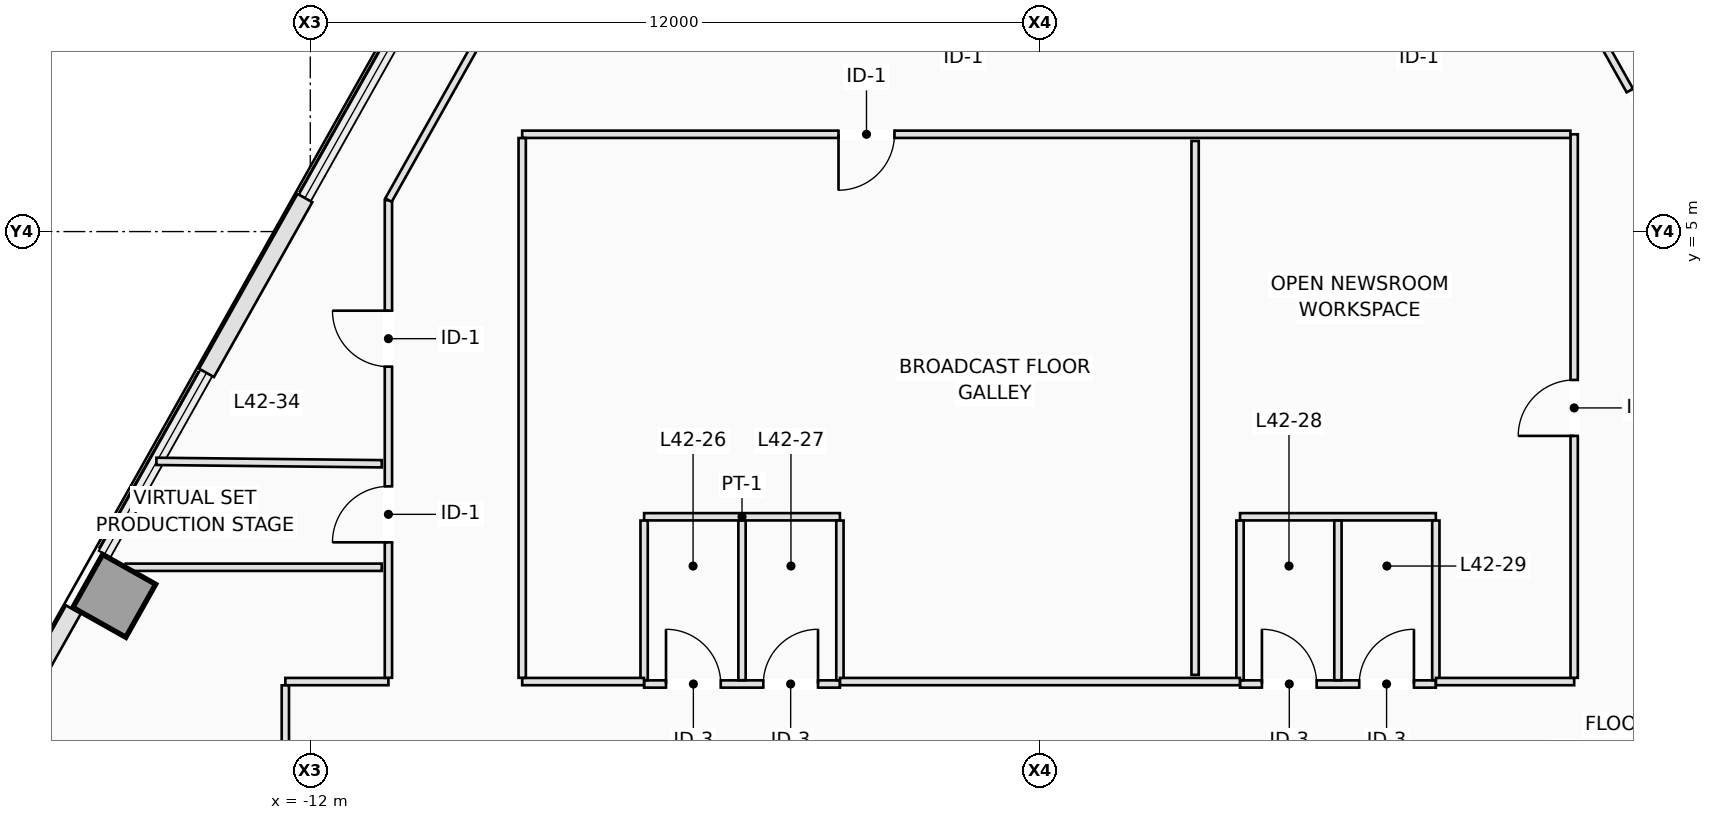
"""IFC4 building model, lengths in metres.
Left out: names, types, materials, properties, quantities, classifications, styles, units other than length and angle.
Written with IfcOpenShell. Run it as: python <this file> out.ifc"""

import sys

from ifc_helpers import new_model, si_unit, direction, frame, frame_2d, origin, origin_2d, place, context, subcontext, project, spatial, rectangle, extrude, element, fill, save


model = new_model("IFC4")
c1 = context("Model", 3, precision=1e-05, world=origin(), true_north=direction((0.0, 1.0)))
c2 = subcontext(c1, "Body", "Model", "MODEL_VIEW")
j1 = project(units=[si_unit("LENGTHUNIT", "METRE"), si_unit("PLANEANGLEUNIT", "RADIAN")], contexts=[c1])
p1 = place(None, origin())
s1 = spatial("IfcSite", under=j1, at=p1, CompositionType="ELEMENT")
p2 = place(p1, origin())
s2 = spatial("IfcBuilding", under=s1, at=p2, CompositionType="ELEMENT")
p3 = place(p2, frame((0.0, 0.0, 154.5)))
s3 = spatial("IfcBuildingStorey", under=s2, at=p3, CompositionType="ELEMENT", Elevation=154.5)
p4 = place(p3, frame((-15.224, -0.991, 0.0), z_axis=(0.0, 0.0, 1.0), x_axis=(-0.871575139605, 0.490261946333, 0.0)))
e1 = element("IfcColumn", 1, at=p4, inside=s3, PredefinedType="COLUMN", context=c2, shape_type="SweptSolid", body=[
    extrude(rectangle(XDim=1.0, YDim=1.0, at=origin_2d()), origin(), (0.0, 0.0, 1.0), 3.5),
])
p5 = place(p3, frame((-17.154, -3.453, 0.0), z_axis=(0.0, 0.0, 1.0), x_axis=(0.490229640206, 0.871593311048, 0.0)))
e2 = element("IfcWall", 2, at=p5, inside=s3, PredefinedType="STANDARD", context=c2, shape_type="SweptSolid", body=[
    extrude(rectangle(XDim=2.568, YDim=0.28, at=frame_2d((1.284, 0.0))), origin(), (0.0, 0.0, 1.0), 3.25),
])
p6 = place(p3, frame((-13.706, 2.677, 0.0), z_axis=(0.0, 0.0, 1.0), x_axis=(0.490285834707, 0.871561701938, 0.0)))
e3 = element("IfcWall", 3, at=p6, inside=s3, PredefinedType="STANDARD", context=c2, shape_type="SweptSolid", body=[
    extrude(rectangle(XDim=3.299, YDim=0.28, at=frame_2d((1.649, 0.0))), origin(), (0.0, 0.0, 1.0), 3.25),
])
p7 = place(p3, frame((-6.51, -2.44, 0.0), z_axis=(0.0, 0.0, 1.0), x_axis=(1.0, 0.0, 0.0)))
e4 = element("IfcWall", 4, at=p7, inside=s3, PredefinedType="PARTITIONING", context=c2, shape_type="SweptSolid", body=[
    extrude(rectangle(XDim=3.22, YDim=0.12, at=frame_2d((1.61, 0.0))), origin(), (0.0, 0.0, 1.0), 2.891),
])
p8 = place(p7, frame((0.36, 0.0, 0.0)))
e5 = element("IfcOpeningElement", 5, at=p8, cuts=e4, PredefinedType="OPENING", context=c2, shape_type="SweptSolid", body=[
    extrude(rectangle(XDim=0.9, YDim=2.12, at=frame_2d((0.45, 1.06))), frame((0.0, 0.07, 0.0), z_axis=(0.0, -1.0, 0.0), x_axis=(1.0, 0.0, 0.0)), (0.0, 0.0, 1.0), 0.14),
])
p9 = place(p7, frame((1.96, 0.0, 0.0)))
e6 = element("IfcOpeningElement", 6, at=p9, cuts=e4, PredefinedType="OPENING", context=c2, shape_type="SweptSolid", body=[
    extrude(rectangle(XDim=0.9, YDim=2.12, at=frame_2d((0.45, 1.06))), frame((0.0, 0.07, 0.0), z_axis=(0.0, -1.0, 0.0), x_axis=(1.0, 0.0, 0.0)), (0.0, 0.0, 1.0), 0.14),
])
p10 = place(p3, frame((-6.51, 0.31, 0.0), z_axis=(0.0, 0.0, 1.0), x_axis=(1.0, 0.0, 0.0)))
e7 = element("IfcWall", 7, at=p10, inside=s3, PredefinedType="PARTITIONING", context=c2, shape_type="SweptSolid", body=[
    extrude(rectangle(XDim=3.22, YDim=0.12, at=frame_2d((1.61, 0.0))), origin(), (0.0, 0.0, 1.0), 3.25),
])
for number, where, z_axis, x_axis in (
    (8, (-6.51, -2.378, 0.0), (0.0, 0.0, 1.0), (0.0, 1.0, 0.0)),
    (9, (-4.9, -2.378, 0.0), (0.0, 0.0, 1.0), (0.0, 1.0, 0.0)),
    (10, (-3.29, -2.378, 0.0), (0.0, 0.0, 1.0), (0.0, 1.0, 0.0)),
):
    element("IfcWall", number, at=place(p3, frame(where, z_axis=z_axis, x_axis=x_axis)), inside=s3, PredefinedType="PARTITIONING", context=c2, shape_type="SweptSolid", body=[
        extrude(rectangle(XDim=2.626, YDim=0.12, at=frame_2d((1.313, 0.0))), origin(), (0.0, 0.0, 1.0), 3.25),
    ])
p11 = place(p3, frame((3.29, -2.44, 0.0), z_axis=(0.0, 0.0, 1.0), x_axis=(1.0, 0.0, 0.0)))
e11 = element("IfcWall", 11, at=p11, inside=s3, PredefinedType="PARTITIONING", context=c2, shape_type="SweptSolid", body=[
    extrude(rectangle(XDim=3.22, YDim=0.12, at=frame_2d((1.61, 0.0))), origin(), (0.0, 0.0, 1.0), 2.891),
])
p12 = place(p11, frame((0.36, 0.0, 0.0)))
e12 = element("IfcOpeningElement", 12, at=p12, cuts=e11, PredefinedType="OPENING", context=c2, shape_type="SweptSolid", body=[
    extrude(rectangle(XDim=0.9, YDim=2.12, at=frame_2d((0.45, 1.06))), frame((0.0, 0.07, 0.0), z_axis=(0.0, -1.0, 0.0), x_axis=(1.0, 0.0, 0.0)), (0.0, 0.0, 1.0), 0.14),
])
p13 = place(p11, frame((1.96, 0.0, 0.0)))
e13 = element("IfcOpeningElement", 13, at=p13, cuts=e11, PredefinedType="OPENING", context=c2, shape_type="SweptSolid", body=[
    extrude(rectangle(XDim=0.9, YDim=2.12, at=frame_2d((0.45, 1.06))), frame((0.0, 0.07, 0.0), z_axis=(0.0, -1.0, 0.0), x_axis=(1.0, 0.0, 0.0)), (0.0, 0.0, 1.0), 0.14),
])
p14 = place(p3, frame((3.29, 0.31, 0.0), z_axis=(0.0, 0.0, 1.0), x_axis=(1.0, 0.0, 0.0)))
e14 = element("IfcWall", 14, at=p14, inside=s3, PredefinedType="PARTITIONING", context=c2, shape_type="SweptSolid", body=[
    extrude(rectangle(XDim=3.22, YDim=0.12, at=frame_2d((1.61, 0.0))), origin(), (0.0, 0.0, 1.0), 3.25),
])
for number, where, z_axis, x_axis in (
    (15, (3.29, -2.378, 0.0), (0.0, 0.0, 1.0), (0.0, 1.0, 0.0)),
    (16, (4.9, -2.378, 0.0), (0.0, 0.0, 1.0), (0.0, 1.0, 0.0)),
    (17, (6.51, -2.378, 0.0), (0.0, 0.0, 1.0), (0.0, 1.0, 0.0)),
):
    element("IfcWall", number, at=place(p3, frame(where, z_axis=z_axis, x_axis=x_axis)), inside=s3, PredefinedType="PARTITIONING", context=c2, shape_type="SweptSolid", body=[
        extrude(rectangle(XDim=2.626, YDim=0.12, at=frame_2d((1.313, 0.0))), origin(), (0.0, 0.0, 1.0), 3.25),
    ])
p15 = place(p3, frame((-12.41, -2.4, 0.0), z_axis=(0.0, 0.0, 1.0), x_axis=(1.0, 0.0, 0.0)))
e18 = element("IfcWall", 18, at=p15, inside=s3, PredefinedType="PARTITIONING", context=c2, shape_type="SweptSolid", body=[
    extrude(rectangle(XDim=1.695, YDim=0.12, at=frame_2d((0.847, 0.0))), origin(), (0.0, 0.0, 1.0), 3.25),
])
p16 = place(p3, frame((-10.715, -2.338, 0.0), z_axis=(0.0, 0.0, 1.0), x_axis=(0.0, 1.0, 0.0)))
e19 = element("IfcWall", 19, at=p16, inside=s3, PredefinedType="PARTITIONING", context=c2, shape_type="SweptSolid", body=[
    extrude(rectangle(XDim=7.854, YDim=0.12, at=frame_2d((3.927, 0.0))), origin(), (0.0, 0.0, 1.0), 3.25),
])
p17 = place(p16, frame((5.117, 0.0, 0.0)))
e20 = element("IfcOpeningElement", 20, at=p17, cuts=e19, PredefinedType="OPENING", context=c2, shape_type="SweptSolid", body=[
    extrude(rectangle(XDim=0.92, YDim=2.12, at=frame_2d((0.46, 1.06))), frame((0.0, 0.07, 0.0), z_axis=(0.0, -1.0, 0.0), x_axis=(1.0, 0.0, 0.0)), (0.0, 0.0, 1.0), 0.14),
])
p18 = place(p16, frame((2.228, 0.0, 0.0)))
e21 = element("IfcOpeningElement", 21, at=p18, cuts=e19, PredefinedType="OPENING", context=c2, shape_type="SweptSolid", body=[
    extrude(rectangle(XDim=0.92, YDim=2.12, at=frame_2d((0.46, 1.06))), frame((0.0, 0.07, 0.0), z_axis=(0.0, -1.0, 0.0), x_axis=(1.0, 0.0, 0.0)), (0.0, 0.0, 1.0), 0.14),
])
p19 = place(p3, frame((-10.714, 5.518, 0.0), z_axis=(0.0, 0.0, 1.0), x_axis=(0.490248927543, 0.871582462561, 0.0)))
e22 = element("IfcWall", 22, at=p19, inside=s3, PredefinedType="PARTITIONING", context=c2, shape_type="SweptSolid", body=[
    extrude(rectangle(XDim=3.766, YDim=0.12, at=frame_2d((1.883, 0.0))), origin(), (0.0, 0.0, 1.0), 3.25),
])
p20 = place(p3, frame((8.87, 8.796, 0.0), z_axis=(0.0, 0.0, 1.0), x_axis=(0.490296163189, -0.871555891703, 0.0)))
e23 = element("IfcWall", 23, at=p20, inside=s3, PredefinedType="PARTITIONING", context=c2, shape_type="SweptSolid", body=[
    extrude(rectangle(XDim=4.315, YDim=0.12, at=frame_2d((2.157, 0.0))), origin(), (0.0, 0.0, 1.0), 3.25),
])
p21 = place(p20, frame((1.695, 0.0, 0.0)))
e24 = element("IfcOpeningElement", 24, at=p21, cuts=e23, PredefinedType="OPENING", context=c2, shape_type="SweptSolid", body=[
    extrude(rectangle(XDim=0.92, YDim=2.12, at=frame_2d((0.46, 1.06))), frame((0.0, 0.07, 0.0), z_axis=(0.0, -1.0, 0.0), x_axis=(1.0, 0.0, 0.0)), (0.0, 0.0, 1.0), 0.14),
])
p22 = place(p3, frame((-12.41, -4.248, 0.0), z_axis=(0.0, 0.0, 1.0), x_axis=(0.0, 1.0, 0.0)))
e25 = element("IfcWall", 25, at=p22, inside=s3, PredefinedType="PARTITIONING", context=c2, shape_type="SweptSolid", body=[
    extrude(rectangle(XDim=1.786, YDim=0.12, at=frame_2d((0.893, 0.0))), origin(), (0.0, 0.0, 1.0), 3.25),
])
p23 = place(p3, frame((-8.515, -2.4, 0.0), z_axis=(0.0, 0.0, 1.0), x_axis=(1.0, 0.0, 0.0)))
e26 = element("IfcWall", 26, at=p23, inside=s3, PredefinedType="PARTITIONING", context=c2, shape_type="SweptSolid", body=[
    extrude(rectangle(XDim=2.003, YDim=0.12, at=frame_2d((1.001, 0.0))), origin(), (0.0, 0.0, 1.0), 3.25),
])
p24 = place(p3, frame((-3.288, -2.4, 0.0), z_axis=(0.0, 0.0, 1.0), x_axis=(1.0, 0.0, 0.0)))
e27 = element("IfcWall", 27, at=p24, inside=s3, PredefinedType="PARTITIONING", context=c2, shape_type="SweptSolid", body=[
    extrude(rectangle(XDim=6.576, YDim=0.12, at=frame_2d((3.288, 0.0))), origin(), (0.0, 0.0, 1.0), 2.891),
])
p25 = place(p3, frame((6.512, -2.4, 0.0), z_axis=(0.0, 0.0, 1.0), x_axis=(1.0, 0.0, 0.0)))
e28 = element("IfcWall", 28, at=p25, inside=s3, PredefinedType="PARTITIONING", context=c2, shape_type="SweptSolid", body=[
    extrude(rectangle(XDim=2.273, YDim=0.12, at=frame_2d((1.136, 0.0))), origin(), (0.0, 0.0, 1.0), 3.25),
])
p26 = place(p3, frame((8.785, -2.338, 0.0), z_axis=(0.0, 0.0, 1.0), x_axis=(0.0, 1.0, 0.0)))
e29 = element("IfcWall", 29, at=p26, inside=s3, PredefinedType="PARTITIONING", context=c2, shape_type="SweptSolid", body=[
    extrude(rectangle(XDim=8.938, YDim=0.12, at=frame_2d((4.469, 0.0))), origin(), (0.0, 0.0, 1.0), 3.25),
])
p27 = place(p26, frame((3.978, 0.0, 0.0)))
e30 = element("IfcOpeningElement", 30, at=p27, cuts=e29, PredefinedType="OPENING", context=c2, shape_type="SweptSolid", body=[
    extrude(rectangle(XDim=0.92, YDim=2.12, at=frame_2d((0.46, 1.06))), frame((0.0, 0.07, 0.0), z_axis=(0.0, -1.0, 0.0), x_axis=(1.0, 0.0, 0.0)), (0.0, 0.0, 1.0), 0.14),
])
p28 = place(p3, frame((8.723, 6.6, 0.0), z_axis=(0.0, 0.0, 1.0), x_axis=(-1.0, 0.0, 0.0)))
e31 = element("IfcWall", 31, at=p28, inside=s3, PredefinedType="PARTITIONING", context=c2, shape_type="SweptSolid", body=[
    extrude(rectangle(XDim=17.238, YDim=0.12, at=frame_2d((8.619, 0.0))), origin(), (0.0, 0.0, 1.0), 2.891),
])
p29 = place(p28, frame((11.116, 0.0, 0.0)))
e32 = element("IfcOpeningElement", 32, at=p29, cuts=e31, PredefinedType="OPENING", context=c2, shape_type="SweptSolid", body=[
    extrude(rectangle(XDim=0.92, YDim=2.12, at=frame_2d((0.46, 1.06))), frame((0.0, 0.07, 0.0), z_axis=(0.0, -1.0, 0.0), x_axis=(1.0, 0.0, 0.0)), (0.0, 0.0, 1.0), 0.14),
])
p30 = place(p3, frame((-8.515, 6.538, 0.0), z_axis=(0.0, 0.0, 1.0), x_axis=(0.0, -1.0, 0.0)))
e33 = element("IfcWall", 33, at=p30, inside=s3, PredefinedType="PARTITIONING", context=c2, shape_type="SweptSolid", body=[
    extrude(rectangle(XDim=8.876, YDim=0.12, at=frame_2d((4.438, 0.0))), origin(), (0.0, 0.0, 1.0), 3.25),
])
p31 = place(p3, frame((-10.825, 1.182, 0.0), z_axis=(0.0, 0.0, 1.0), x_axis=(-0.999943044741, 0.010672735093, 0.0)))
e34 = element("IfcWall", 34, at=p31, inside=s3, PredefinedType="PARTITIONING", context=c2, shape_type="SweptSolid", body=[
    extrude(rectangle(XDim=3.706, YDim=0.12, at=frame_2d((1.853, 0.0))), origin(), (0.0, 0.0, 1.0), 3.25),
])
p32 = place(p3, frame((2.551, -2.29, 0.0), z_axis=(0.0, 0.0, 1.0), x_axis=(0.0, 1.0, 0.0)))
e35 = element("IfcWall", 35, at=p32, inside=s3, PredefinedType="PARTITIONING", context=c2, shape_type="SweptSolid", body=[
    extrude(rectangle(XDim=8.78, YDim=0.12, at=frame_2d((4.39, 0.0))), origin(), (0.0, 0.0, 1.0), 3.25),
])
p33 = place(p3, frame((-10.825, -0.52, 0.0), z_axis=(0.0, 0.0, 1.0), x_axis=(-1.0, 0.0, 0.0)))
e36 = element("IfcWall", 36, at=p33, inside=s3, PredefinedType="PARTITIONING", context=c2, shape_type="SweptSolid", body=[
    extrude(rectangle(XDim=4.211, YDim=0.12, at=frame_2d((2.106, 0.0))), origin(), (0.0, 0.0, 1.0), 3.25),
])
p34 = place(p8, origin())
e37 = element("IfcDoor", 37, at=p34, inside=s3, OperationType="SINGLE_SWING_LEFT", PredefinedType="DOOR", context=c2, shape_type="SweptSolid", body=[
    extrude(rectangle(XDim=0.9, YDim=2.12, at=frame_2d((0.45, 1.06))), frame((0.0, 0.025, 0.0), z_axis=(0.0, -1.0, 0.0), x_axis=(1.0, 0.0, 0.0)), (0.0, 0.0, 1.0), 0.05),
])
fill(e5, e37)
p35 = place(p9, origin())
e38 = element("IfcDoor", 38, at=p35, inside=s3, OperationType="SINGLE_SWING_RIGHT", PredefinedType="DOOR", context=c2, shape_type="SweptSolid", body=[
    extrude(rectangle(XDim=0.9, YDim=2.12, at=frame_2d((0.45, 1.06))), frame((0.0, 0.025, 0.0), z_axis=(0.0, -1.0, 0.0), x_axis=(1.0, 0.0, 0.0)), (0.0, 0.0, 1.0), 0.05),
])
fill(e6, e38)
p36 = place(p12, origin())
e39 = element("IfcDoor", 39, at=p36, inside=s3, OperationType="SINGLE_SWING_LEFT", PredefinedType="DOOR", context=c2, shape_type="SweptSolid", body=[
    extrude(rectangle(XDim=0.9, YDim=2.12, at=frame_2d((0.45, 1.06))), frame((0.0, 0.025, 0.0), z_axis=(0.0, -1.0, 0.0), x_axis=(1.0, 0.0, 0.0)), (0.0, 0.0, 1.0), 0.05),
])
fill(e12, e39)
p37 = place(p13, origin())
e40 = element("IfcDoor", 40, at=p37, inside=s3, OperationType="SINGLE_SWING_RIGHT", PredefinedType="DOOR", context=c2, shape_type="SweptSolid", body=[
    extrude(rectangle(XDim=0.9, YDim=2.12, at=frame_2d((0.45, 1.06))), frame((0.0, 0.025, 0.0), z_axis=(0.0, -1.0, 0.0), x_axis=(1.0, 0.0, 0.0)), (0.0, 0.0, 1.0), 0.05),
])
fill(e13, e40)
p38 = place(p21, origin())
e41 = element("IfcDoor", 41, at=p38, inside=s3, OperationType="SINGLE_SWING_LEFT", PredefinedType="DOOR", context=c2, shape_type="SweptSolid", body=[
    extrude(rectangle(XDim=0.92, YDim=2.12, at=frame_2d((0.46, 1.06))), frame((0.0, 0.025, 0.0), z_axis=(0.0, -1.0, 0.0), x_axis=(1.0, 0.0, 0.0)), (0.0, 0.0, 1.0), 0.05),
])
fill(e24, e41)
p39 = place(p17, origin())
e42 = element("IfcDoor", 42, at=p39, inside=s3, OperationType="SINGLE_SWING_RIGHT", PredefinedType="DOOR", context=c2, shape_type="SweptSolid", body=[
    extrude(rectangle(XDim=0.92, YDim=2.12, at=frame_2d((0.46, 1.06))), frame((0.0, 0.025, 0.0), z_axis=(0.0, -1.0, 0.0), x_axis=(1.0, 0.0, 0.0)), (0.0, 0.0, 1.0), 0.05),
])
fill(e20, e42)
p40 = place(p27, origin())
e43 = element("IfcDoor", 43, at=p40, inside=s3, OperationType="SINGLE_SWING_LEFT", PredefinedType="DOOR", context=c2, shape_type="SweptSolid", body=[
    extrude(rectangle(XDim=0.92, YDim=2.12, at=frame_2d((0.46, 1.06))), frame((0.0, 0.025, 0.0), z_axis=(0.0, -1.0, 0.0), x_axis=(1.0, 0.0, 0.0)), (0.0, 0.0, 1.0), 0.05),
])
fill(e30, e43)
p41 = place(p29, origin())
e44 = element("IfcDoor", 44, at=p41, inside=s3, OperationType="SINGLE_SWING_RIGHT", PredefinedType="DOOR", context=c2, shape_type="SweptSolid", body=[
    extrude(rectangle(XDim=0.92, YDim=2.12, at=frame_2d((0.46, 1.06))), frame((0.0, 0.025, 0.0), z_axis=(0.0, -1.0, 0.0), x_axis=(1.0, 0.0, 0.0)), (0.0, 0.0, 1.0), 0.05),
])
fill(e32, e44)
p42 = place(p18, origin())
e45 = element("IfcDoor", 45, at=p42, inside=s3, OperationType="SINGLE_SWING_LEFT", PredefinedType="DOOR", context=c2, shape_type="SweptSolid", body=[
    extrude(rectangle(XDim=0.92, YDim=2.12, at=frame_2d((0.46, 1.06))), frame((0.0, 0.025, 0.0), z_axis=(0.0, -1.0, 0.0), x_axis=(1.0, 0.0, 0.0)), (0.0, 0.0, 1.0), 0.05),
])
fill(e21, e45)
save(model, sys.argv[1])
